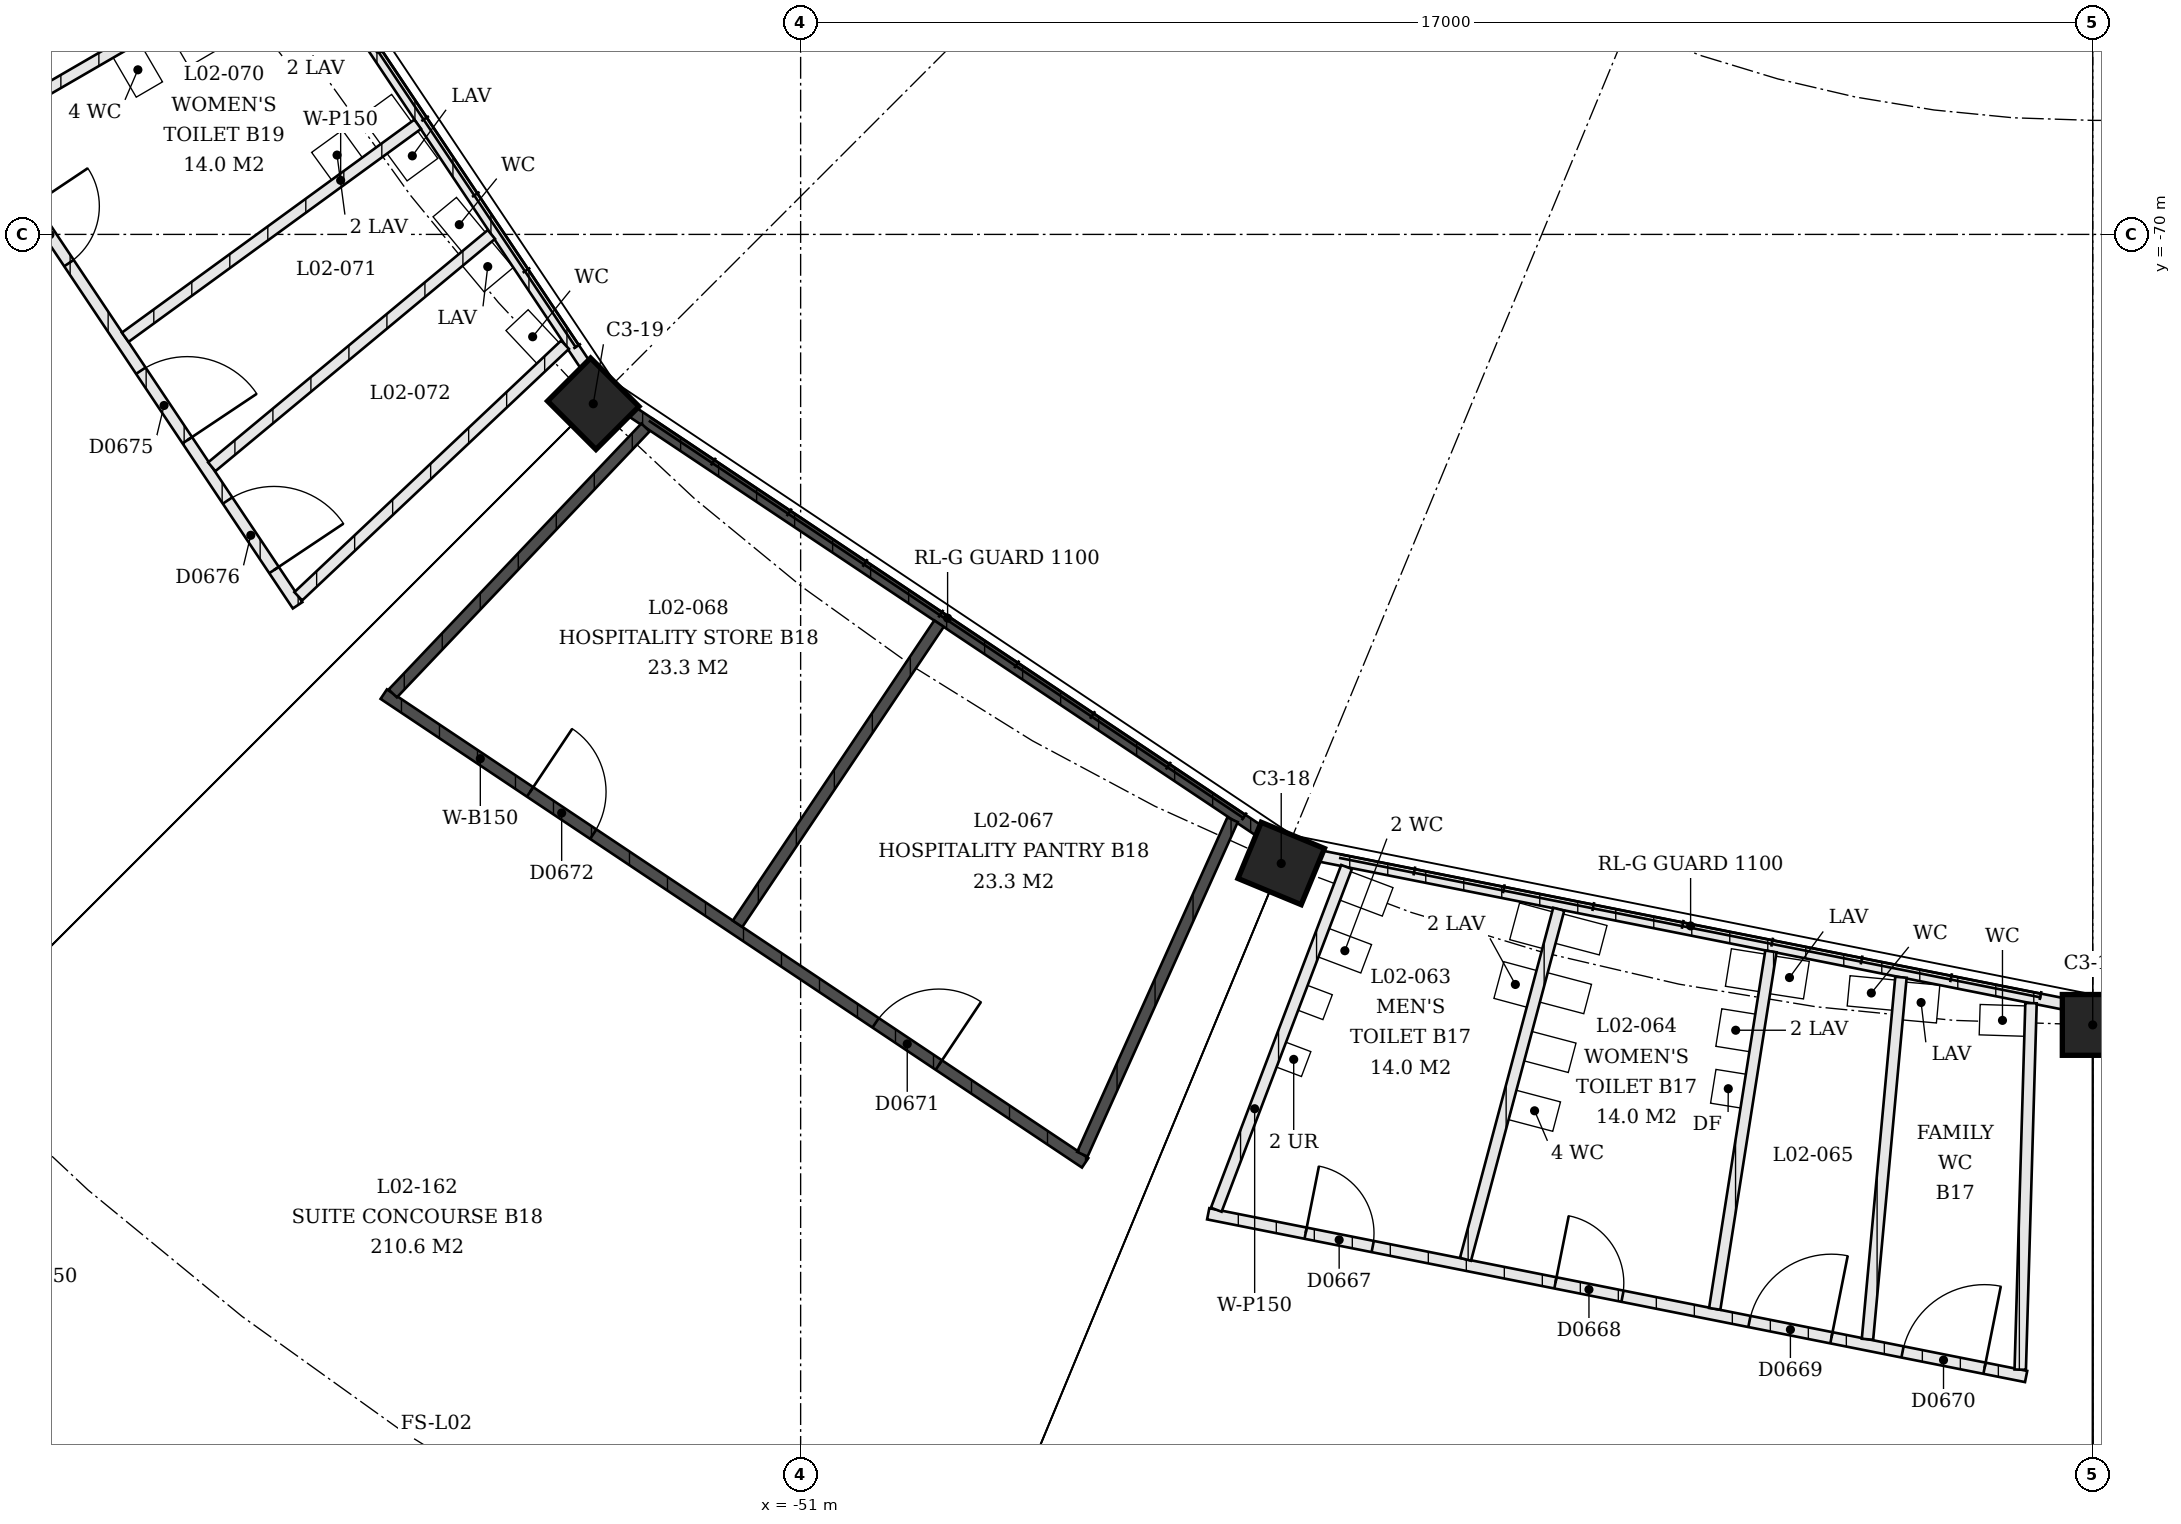
"""IFC4 building model, lengths in metres.
Left out: names, types, materials, properties, quantities, classifications, styles, units other than length and angle.
Written with IfcOpenShell. Run it as: python <this file> out.ifc"""

import sys

from ifc_helpers import new_model, si_unit, direction, frame, frame_2d, origin, origin_2d, place, context, subcontext, project, spatial, rectangle, extrude, element, fill, save


model = new_model("IFC4")
c1 = context("Model", 3, precision=1e-05, world=origin(), true_north=direction((0.0, 1.0)))
c2 = subcontext(c1, "Body", "Model", "MODEL_VIEW")
j1 = project(units=[si_unit("LENGTHUNIT", "METRE"), si_unit("PLANEANGLEUNIT", "RADIAN")], contexts=[c1])
p1 = place(None, origin())
s1 = spatial("IfcSite", under=j1, at=p1, CompositionType="ELEMENT")
p2 = place(p1, origin())
s2 = spatial("IfcBuilding", under=s1, at=p2, CompositionType="ELEMENT")
p3 = place(p2, frame((0.0, 0.0, 9.0)))
s3 = spatial("IfcBuildingStorey", under=s2, at=p3, CompositionType="ELEMENT", Elevation=9.0)
p4 = place(p3, frame((-34.0, -80.4, 0.0), z_axis=(0.0, 0.0, 1.0), x_axis=(1.0, 0.0, 0.0)))
e1 = element("IfcColumn", 1, at=p4, inside=s3, PredefinedType="COLUMN", context=c2, shape_type="SweptSolid", body=[
    extrude(rectangle(XDim=0.8, YDim=0.8, at=origin_2d()), origin(), (0.0, 0.0, 1.0), 4.5),
])
for number, where, z_axis, x_axis in (
    (2, (-44.677, -78.276, 0.0), (0.0, 0.0, 1.0), (0.924, -0.383, 0.0)),
    (3, (-53.728, -72.228, 0.0), (0.0, 0.0, 1.0), (0.707, -0.707, 0.0)),
):
    element("IfcColumn", number, at=place(p3, frame(where, z_axis=z_axis, x_axis=x_axis)), inside=s3, PredefinedType="COLUMN", context=c2, shape_type="SweptSolid", body=[
        extrude(rectangle(XDim=0.9, YDim=0.8, at=origin_2d()), origin(), (0.0, 0.0, 1.0), 4.5),
    ])
p5 = place(p3, frame((-44.15, -78.181, 0.0), z_axis=(0.0, 0.0, 1.0), x_axis=(0.980786042223, -0.195086492048, 0.0)))
e4 = element("IfcWall", 4, at=p5, inside=s3, PredefinedType="PARTITIONING", context=c2, shape_type="SweptSolid", body=[
    extrude(rectangle(XDim=9.941, YDim=0.15, at=frame_2d((4.971, 0.0))), origin(), (0.0, 0.0, 1.0), 3.0),
])
p6 = place(p3, frame((-45.638, -82.885, 0.0), z_axis=(0.0, 0.0, 1.0), x_axis=(0.980788934186, -0.195071952313, 0.0)))
e5 = element("IfcWall", 5, at=p6, inside=s3, PredefinedType="PARTITIONING", context=c2, shape_type="SweptSolid", body=[
    extrude(rectangle(XDim=10.972, YDim=0.15, at=frame_2d((5.486, 0.0))), origin(), (0.0, 0.0, 1.0), 3.0),
])
p7 = place(p6, frame((1.307, 0.0, 0.0)))
e6 = element("IfcOpeningElement", 6, at=p7, cuts=e5, PredefinedType="OPENING", context=c2, shape_type="SweptSolid", body=[
    extrude(rectangle(XDim=0.9, YDim=2.1, at=frame_2d((0.45, 1.05))), frame((0.0, 0.075, 0.0), z_axis=(0.0, -1.0, 0.0), x_axis=(1.0, 0.0, 0.0)), (0.0, 0.0, 1.0), 0.15),
])
p8 = place(p6, frame((4.658, 0.0, 0.0)))
e7 = element("IfcOpeningElement", 7, at=p8, cuts=e5, PredefinedType="OPENING", context=c2, shape_type="SweptSolid", body=[
    extrude(rectangle(XDim=0.9, YDim=2.1, at=frame_2d((0.45, 1.05))), frame((0.0, 0.075, 0.0), z_axis=(0.0, -1.0, 0.0), x_axis=(1.0, 0.0, 0.0)), (0.0, 0.0, 1.0), 0.15),
])
p9 = place(p6, frame((7.26, 0.0, 0.0)))
e8 = element("IfcOpeningElement", 8, at=p9, cuts=e5, PredefinedType="OPENING", context=c2, shape_type="SweptSolid", body=[
    extrude(rectangle(XDim=1.1, YDim=2.1, at=frame_2d((0.55, 1.05))), frame((0.0, 0.075, 0.0), z_axis=(0.0, -1.0, 0.0), x_axis=(1.0, 0.0, 0.0)), (0.0, 0.0, 1.0), 0.15),
])
p10 = place(p6, frame((9.314, 0.0, 0.0)))
e9 = element("IfcOpeningElement", 9, at=p10, cuts=e5, PredefinedType="OPENING", context=c2, shape_type="SweptSolid", body=[
    extrude(rectangle(XDim=1.1, YDim=2.1, at=frame_2d((0.55, 1.05))), frame((0.0, 0.075, 0.0), z_axis=(0.0, -1.0, 0.0), x_axis=(1.0, 0.0, 0.0)), (0.0, 0.0, 1.0), 0.15),
])
p11 = place(p3, frame((-43.817, -78.322, 0.0), z_axis=(0.0, 0.0, 1.0), x_axis=(-0.35538492255, -0.934720041951, 0.0)))
e10 = element("IfcWall", 10, at=p11, inside=s3, PredefinedType="PARTITIONING", context=c2, shape_type="SweptSolid", body=[
    extrude(rectangle(XDim=4.824, YDim=0.15, at=frame_2d((2.412, 0.0))), origin(), (0.0, 0.0, 1.0), 3.0),
])
p12 = place(p3, frame((-41.026, -78.877, 0.0), z_axis=(0.0, 0.0, 1.0), x_axis=(-0.257378912157, -0.966310558556, 0.0)))
e11 = element("IfcWall", 11, at=p12, inside=s3, PredefinedType="PARTITIONING", context=c2, shape_type="SweptSolid", body=[
    extrude(rectangle(XDim=4.767, YDim=0.15, at=frame_2d((2.383, 0.0))), origin(), (0.0, 0.0, 1.0), 3.0),
])
p13 = place(p3, frame((-38.234, -79.433, 0.0), z_axis=(0.0, 0.0, 1.0), x_axis=(-0.155285736325, -0.987869596705, 0.0)))
e12 = element("IfcWall", 12, at=p13, inside=s3, PredefinedType="PARTITIONING", context=c2, shape_type="SweptSolid", body=[
    extrude(rectangle(XDim=4.761, YDim=0.15, at=frame_2d((2.38, 0.0))), origin(), (0.0, 0.0, 1.0), 3.0),
])
p14 = place(p3, frame((-36.523, -79.773, 0.0), z_axis=(0.0, 0.0, 1.0), x_axis=(-0.09208667632, -0.995750995, 0.0)))
e13 = element("IfcWall", 13, at=p14, inside=s3, PredefinedType="PARTITIONING", context=c2, shape_type="SweptSolid", body=[
    extrude(rectangle(XDim=4.783, YDim=0.15, at=frame_2d((2.391, 0.0))), origin(), (0.0, 0.0, 1.0), 3.0),
])
p15 = place(p3, frame((-34.812, -80.114, 0.0), z_axis=(0.0, 0.0, 1.0), x_axis=(-0.029405000692, -0.999567579473, 0.0)))
e14 = element("IfcWall", 14, at=p15, inside=s3, PredefinedType="PARTITIONING", context=c2, shape_type="SweptSolid", body=[
    extrude(rectangle(XDim=4.824, YDim=0.15, at=frame_2d((2.412, 0.0))), origin(), (0.0, 0.0, 1.0), 3.0),
])
p16 = place(p3, frame((-44.982, -77.837, 0.0), z_axis=(0.0, 0.0, 1.0), x_axis=(-0.831461186136, 0.555582843463, 0.0)))
e15 = element("IfcWall", 15, at=p16, inside=s3, PredefinedType="SOLIDWALL", context=c2, shape_type="SweptSolid", body=[
    extrude(rectangle(XDim=9.89, YDim=0.15, at=frame_2d((4.945, 0.0))), origin(), (0.0, 0.0, 1.0), 3.0),
])
p17 = place(p3, frame((-47.257, -82.215, 0.0), z_axis=(0.0, 0.0, 1.0), x_axis=(-0.831471162003, 0.555567913722, 0.0)))
e16 = element("IfcWall", 16, at=p17, inside=s3, PredefinedType="SOLIDWALL", context=c2, shape_type="SweptSolid", body=[
    extrude(rectangle(XDim=11.099, YDim=0.15, at=frame_2d((5.55, 0.0))), origin(), (0.0, 0.0, 1.0), 3.0),
])
p18 = place(p17, frame((2.315, 0.0, 0.0)))
e17 = element("IfcOpeningElement", 17, at=p18, cuts=e16, PredefinedType="OPENING", context=c2, shape_type="SweptSolid", body=[
    extrude(rectangle(XDim=1.0, YDim=2.1, at=frame_2d((0.5, 1.05))), frame((0.0, 0.075, 0.0), z_axis=(0.0, -1.0, 0.0), x_axis=(1.0, 0.0, 0.0)), (0.0, 0.0, 1.0), 0.15),
])
p19 = place(p17, frame((7.784, 0.0, 0.0)))
e18 = element("IfcOpeningElement", 18, at=p19, cuts=e16, PredefinedType="OPENING", context=c2, shape_type="SweptSolid", body=[
    extrude(rectangle(XDim=1.0, YDim=2.1, at=frame_2d((0.5, 1.05))), frame((0.0, 0.075, 0.0), z_axis=(0.0, -1.0, 0.0), x_axis=(1.0, 0.0, 0.0)), (0.0, 0.0, 1.0), 0.15),
])
p20 = place(p3, frame((-45.317, -77.701, 0.0), z_axis=(0.0, 0.0, 1.0), x_axis=(-0.409657452305, -0.912239426779, 0.0)))
e19 = element("IfcWall", 19, at=p20, inside=s3, PredefinedType="SOLIDWALL", context=c2, shape_type="SweptSolid", body=[
    extrude(rectangle(XDim=4.824, YDim=0.15, at=frame_2d((2.412, 0.0))), origin(), (0.0, 0.0, 1.0), 3.0),
])
p21 = place(p3, frame((-49.179, -75.12, 0.0), z_axis=(0.0, 0.0, 1.0), x_axis=(-0.557220399255, -0.830364634756, 0.0)))
e20 = element("IfcWall", 20, at=p21, inside=s3, PredefinedType="SOLIDWALL", context=c2, shape_type="SweptSolid", body=[
    extrude(rectangle(XDim=4.757, YDim=0.15, at=frame_2d((2.378, 0.0))), origin(), (0.0, 0.0, 1.0), 3.0),
])
p22 = place(p3, frame((-53.041, -72.54, 0.0), z_axis=(0.0, 0.0, 1.0), x_axis=(-0.688819908774, -0.724932502566, 0.0)))
e21 = element("IfcWall", 21, at=p22, inside=s3, PredefinedType="SOLIDWALL", context=c2, shape_type="SweptSolid", body=[
    extrude(rectangle(XDim=4.827, YDim=0.15, at=frame_2d((2.414, 0.0))), origin(), (0.0, 0.0, 1.0), 3.0),
])
p23 = place(p3, frame((-59.337, -63.482, 0.0), z_axis=(0.0, 0.0, 1.0), x_axis=(0.555582843463, -0.831461186136, 0.0)))
e22 = element("IfcWall", 22, at=p23, inside=s3, PredefinedType="PARTITIONING", context=c2, shape_type="SweptSolid", body=[
    extrude(rectangle(XDim=9.89, YDim=0.15, at=frame_2d((4.945, 0.0))), origin(), (0.0, 0.0, 1.0), 3.0),
])
p24 = place(p3, frame((-63.715, -65.757, 0.0), z_axis=(0.0, 0.0, 1.0), x_axis=(0.555577934543, -0.831464466258, 0.0)))
e23 = element("IfcWall", 23, at=p24, inside=s3, PredefinedType="PARTITIONING", context=c2, shape_type="SweptSolid", body=[
    extrude(rectangle(XDim=10.972, YDim=0.15, at=frame_2d((5.486, 0.0))), origin(), (0.0, 0.0, 1.0), 3.0),
])
p25 = place(p24, frame((1.307, 0.0, 0.0)))
e24 = element("IfcOpeningElement", 24, at=p25, cuts=e23, PredefinedType="OPENING", context=c2, shape_type="SweptSolid", body=[
    extrude(rectangle(XDim=0.9, YDim=2.1, at=frame_2d((0.45, 1.05))), frame((0.0, 0.075, 0.0), z_axis=(0.0, -1.0, 0.0), x_axis=(1.0, 0.0, 0.0)), (0.0, 0.0, 1.0), 0.15),
])
p26 = place(p24, frame((4.658, 0.0, 0.0)))
e25 = element("IfcOpeningElement", 25, at=p26, cuts=e23, PredefinedType="OPENING", context=c2, shape_type="SweptSolid", body=[
    extrude(rectangle(XDim=0.9, YDim=2.1, at=frame_2d((0.45, 1.05))), frame((0.0, 0.075, 0.0), z_axis=(0.0, -1.0, 0.0), x_axis=(1.0, 0.0, 0.0)), (0.0, 0.0, 1.0), 0.15),
])
p27 = place(p24, frame((7.26, 0.0, 0.0)))
e26 = element("IfcOpeningElement", 26, at=p27, cuts=e23, PredefinedType="OPENING", context=c2, shape_type="SweptSolid", body=[
    extrude(rectangle(XDim=1.1, YDim=2.1, at=frame_2d((0.55, 1.05))), frame((0.0, 0.075, 0.0), z_axis=(0.0, -1.0, 0.0), x_axis=(1.0, 0.0, 0.0)), (0.0, 0.0, 1.0), 0.15),
])
p28 = place(p24, frame((9.314, 0.0, 0.0)))
e27 = element("IfcOpeningElement", 27, at=p28, cuts=e23, PredefinedType="OPENING", context=c2, shape_type="SweptSolid", body=[
    extrude(rectangle(XDim=1.1, YDim=2.1, at=frame_2d((0.55, 1.05))), frame((0.0, 0.075, 0.0), z_axis=(0.0, -1.0, 0.0), x_axis=(1.0, 0.0, 0.0)), (0.0, 0.0, 1.0), 0.15),
])
p29 = place(p3, frame((-57.62, -66.184, 0.0), z_axis=(0.0, 0.0, 1.0), x_axis=(-0.865252065429, -0.5013370755, 0.0)))
e28 = element("IfcWall", 28, at=p29, inside=s3, PredefinedType="PARTITIONING", context=c2, shape_type="SweptSolid", body=[
    extrude(rectangle(XDim=4.767, YDim=0.15, at=frame_2d((2.383, 0.0))), origin(), (0.0, 0.0, 1.0), 3.0),
])
p30 = place(p3, frame((-56.038, -68.551, 0.0), z_axis=(0.0, 0.0, 1.0), x_axis=(-0.808345614711, -0.58870821905, 0.0)))
e29 = element("IfcWall", 29, at=p30, inside=s3, PredefinedType="PARTITIONING", context=c2, shape_type="SweptSolid", body=[
    extrude(rectangle(XDim=4.761, YDim=0.15, at=frame_2d((2.38, 0.0))), origin(), (0.0, 0.0, 1.0), 3.0),
])
p31 = place(p3, frame((-55.069, -70.001, 0.0), z_axis=(0.0, 0.0, 1.0), x_axis=(-0.769237079492, -0.63896346964, 0.0)))
e30 = element("IfcWall", 30, at=p31, inside=s3, PredefinedType="PARTITIONING", context=c2, shape_type="SweptSolid", body=[
    extrude(rectangle(XDim=4.783, YDim=0.15, at=frame_2d((2.391, 0.0))), origin(), (0.0, 0.0, 1.0), 3.0),
])
p32 = place(p3, frame((-54.1, -71.452, 0.0), z_axis=(0.0, 0.0, 1.0), x_axis=(-0.727577136184, -0.686025882093, 0.0)))
e31 = element("IfcWall", 31, at=p32, inside=s3, PredefinedType="PARTITIONING", context=c2, shape_type="SweptSolid", body=[
    extrude(rectangle(XDim=4.824, YDim=0.15, at=frame_2d((2.412, 0.0))), origin(), (0.0, 0.0, 1.0), 3.0),
])
p33 = place(p7, origin())
e32 = element("IfcDoor", 32, at=p33, inside=s3, OperationType="SINGLE_SWING_RIGHT", PredefinedType="DOOR", context=c2, shape_type="SweptSolid", body=[
    extrude(rectangle(XDim=0.9, YDim=2.1, at=frame_2d((0.45, 1.05))), frame((0.0, 0.025, 0.0), z_axis=(0.0, -1.0, 0.0), x_axis=(1.0, 0.0, 0.0)), (0.0, 0.0, 1.0), 0.05),
])
fill(e6, e32)
p34 = place(p8, origin())
e33 = element("IfcDoor", 33, at=p34, inside=s3, OperationType="SINGLE_SWING_RIGHT", PredefinedType="DOOR", context=c2, shape_type="SweptSolid", body=[
    extrude(rectangle(XDim=0.9, YDim=2.1, at=frame_2d((0.45, 1.05))), frame((0.0, 0.025, 0.0), z_axis=(0.0, -1.0, 0.0), x_axis=(1.0, 0.0, 0.0)), (0.0, 0.0, 1.0), 0.05),
])
fill(e7, e33)
p35 = place(p9, origin())
e34 = element("IfcDoor", 34, at=p35, inside=s3, OperationType="SINGLE_SWING_LEFT", PredefinedType="DOOR", context=c2, shape_type="SweptSolid", body=[
    extrude(rectangle(XDim=1.1, YDim=2.1, at=frame_2d((0.55, 1.05))), frame((0.0, 0.025, 0.0), z_axis=(0.0, -1.0, 0.0), x_axis=(1.0, 0.0, 0.0)), (0.0, 0.0, 1.0), 0.05),
])
fill(e8, e34)
p36 = place(p10, origin())
e35 = element("IfcDoor", 35, at=p36, inside=s3, OperationType="SINGLE_SWING_LEFT", PredefinedType="DOOR", context=c2, shape_type="SweptSolid", body=[
    extrude(rectangle(XDim=1.1, YDim=2.1, at=frame_2d((0.55, 1.05))), frame((0.0, 0.025, 0.0), z_axis=(0.0, -1.0, 0.0), x_axis=(1.0, 0.0, 0.0)), (0.0, 0.0, 1.0), 0.05),
])
fill(e9, e35)
p37 = place(p18, origin())
e36 = element("IfcDoor", 36, at=p37, inside=s3, OperationType="SINGLE_SWING_LEFT", PredefinedType="DOOR", context=c2, shape_type="SweptSolid", body=[
    extrude(rectangle(XDim=1.0, YDim=2.1, at=frame_2d((0.5, 1.05))), frame((0.0, 0.025, 0.0), z_axis=(0.0, -1.0, 0.0), x_axis=(1.0, 0.0, 0.0)), (0.0, 0.0, 1.0), 0.05),
])
fill(e17, e36)
p38 = place(p19, origin())
e37 = element("IfcDoor", 37, at=p38, inside=s3, OperationType="SINGLE_SWING_RIGHT", PredefinedType="DOOR", context=c2, shape_type="SweptSolid", body=[
    extrude(rectangle(XDim=1.0, YDim=2.1, at=frame_2d((0.5, 1.05))), frame((0.0, 0.025, 0.0), z_axis=(0.0, -1.0, 0.0), x_axis=(1.0, 0.0, 0.0)), (0.0, 0.0, 1.0), 0.05),
])
fill(e18, e37)
p39 = place(p26, origin())
e38 = element("IfcDoor", 38, at=p39, inside=s3, OperationType="SINGLE_SWING_RIGHT", PredefinedType="DOOR", context=c2, shape_type="SweptSolid", body=[
    extrude(rectangle(XDim=0.9, YDim=2.1, at=frame_2d((0.45, 1.05))), frame((0.0, 0.025, 0.0), z_axis=(0.0, -1.0, 0.0), x_axis=(1.0, 0.0, 0.0)), (0.0, 0.0, 1.0), 0.05),
])
fill(e25, e38)
p40 = place(p27, origin())
e39 = element("IfcDoor", 39, at=p40, inside=s3, OperationType="SINGLE_SWING_LEFT", PredefinedType="DOOR", context=c2, shape_type="SweptSolid", body=[
    extrude(rectangle(XDim=1.1, YDim=2.1, at=frame_2d((0.55, 1.05))), frame((0.0, 0.025, 0.0), z_axis=(0.0, -1.0, 0.0), x_axis=(1.0, 0.0, 0.0)), (0.0, 0.0, 1.0), 0.05),
])
fill(e26, e39)
p41 = place(p28, origin())
e40 = element("IfcDoor", 40, at=p41, inside=s3, OperationType="SINGLE_SWING_LEFT", PredefinedType="DOOR", context=c2, shape_type="SweptSolid", body=[
    extrude(rectangle(XDim=1.1, YDim=2.1, at=frame_2d((0.55, 1.05))), frame((0.0, 0.025, 0.0), z_axis=(0.0, -1.0, 0.0), x_axis=(1.0, 0.0, 0.0)), (0.0, 0.0, 1.0), 0.05),
])
fill(e27, e40)
save(model, sys.argv[1])
